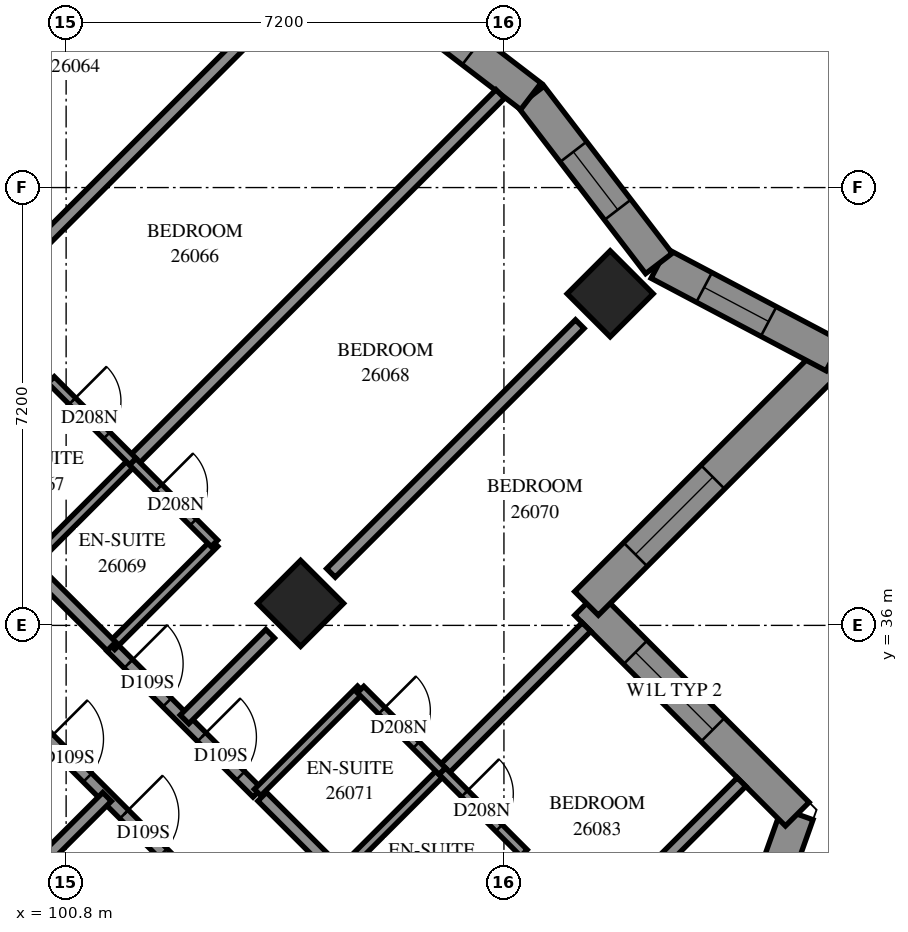
"""IFC4 building model, lengths in metres.
Left out: names, types, materials, properties, quantities, classifications, styles, units other than length and angle.
Written with IfcOpenShell. Run it as: python <this file> out.ifc"""

import sys

from ifc_helpers import new_model, si_unit, direction, frame, frame_2d, origin, origin_2d, place, context, subcontext, project, spatial, polyline, rectangle, outline, extrude, element, fill, save


model = new_model("IFC4")
c1 = context("Model", 3, precision=1e-05, world=origin(), true_north=direction((0.0, 1.0)))
c2 = subcontext(c1, "Body", "Model", "MODEL_VIEW")
j1 = project(units=[si_unit("LENGTHUNIT", "METRE"), si_unit("PLANEANGLEUNIT", "RADIAN")], contexts=[c1])
p1 = place(None, origin())
s1 = spatial("IfcSite", under=j1, at=p1, CompositionType="ELEMENT")
p2 = place(p1, origin())
s2 = spatial("IfcBuilding", under=s1, at=p2, CompositionType="ELEMENT")
p3 = place(p2, frame((0.0, 0.0, 98.2)))
s3 = spatial("IfcBuildingStorey", under=s2, at=p3, CompositionType="ELEMENT", Elevation=98.2)
for number, where, z_axis, x_axis in (
    (1, (109.747, 41.453, 0.0), (0.0, 0.0, 1.0), (0.707, -0.707, 0.0)),
    (2, (104.656, 36.362, 0.0), (0.0, 0.0, 1.0), (0.707, -0.707, 0.0)),
):
    element("IfcColumn", number, at=place(p3, frame(where, z_axis=z_axis, x_axis=x_axis)), inside=s3, PredefinedType="COLUMN", context=c2, shape_type="SweptSolid", body=[
        extrude(rectangle(XDim=1.0, YDim=1.0, at=origin_2d()), origin(), (0.0, 0.0, 1.0), 3.1),
    ])
p4 = place(p3, frame((111.041, 27.901, 0.0), z_axis=(0.0, 0.0, 1.0), x_axis=(0.3360509292, 0.9418438156, 0.0)))
e3 = element("IfcWall", 3, at=p4, inside=s3, PredefinedType="SOLIDWALL", context=c2, shape_type="SweptSolid", body=[
    extrude(outline(polyline([(-0.125, -0.275), (5.478, -0.275), (5.13, 0.275), (0.125, 0.275), (-0.125, -0.275)])), origin(), (0.0, 0.0, 1.0), 3.1),
])
p5 = place(p4, frame((1.466, 0.0, 0.5)))
e4 = element("IfcOpeningElement", 4, at=p5, cuts=e3, PredefinedType="OPENING", context=c2, shape_type="SweptSolid", body=[
    extrude(rectangle(XDim=1.3, YDim=2.45, at=frame_2d((0.65, 1.225))), frame((0.0, 0.285, 0.0), z_axis=(0.0, -1.0, 0.0), x_axis=(1.0, 0.0, 0.0)), (0.0, 0.0, 1.0), 0.57),
])
p6 = place(p4, frame((2.966, 0.0, 0.5)))
e5 = element("IfcOpeningElement", 5, at=p6, cuts=e3, PredefinedType="OPENING", context=c2, shape_type="SweptSolid", body=[
    extrude(rectangle(XDim=1.3, YDim=2.45, at=frame_2d((0.65, 1.225))), frame((0.0, 0.285, 0.0), z_axis=(0.0, -1.0, 0.0), x_axis=(1.0, 0.0, 0.0)), (0.0, 0.0, 1.0), 0.57),
])
p7 = place(p3, frame((112.824, 32.896, 0.0), z_axis=(0.0, 0.0, 1.0), x_axis=(-0.7071067812, 0.7071067812, 0.0)))
e6 = element("IfcWall", 6, at=p7, inside=s3, PredefinedType="SOLIDWALL", context=c2, shape_type="SweptSolid", body=[
    extrude(outline(polyline([(-0.174, -0.275), (4.626, -0.275), (5.176, 0.275), (0.174, 0.275), (-0.174, -0.275)])), origin(), (0.0, 0.0, 1.0), 3.1),
])
p8 = place(p7, frame((1.964, 0.0, 0.6)))
e7 = element("IfcOpeningElement", 7, at=p8, cuts=e6, PredefinedType="OPENING", context=c2, shape_type="SweptSolid", body=[
    extrude(rectangle(XDim=1.8, YDim=1.9, at=frame_2d((0.9, 0.95))), frame((0.0, 0.285, 0.0), z_axis=(0.0, -1.0, 0.0), x_axis=(1.0, 0.0, 0.0)), (0.0, 0.0, 1.0), 0.57),
])
p9 = place(p3, frame((109.358, 36.362, 0.0), z_axis=(0.0, 0.0, 1.0), x_axis=(0.7071067812, 0.7071067812, 0.0)))
e8 = element("IfcWall", 8, at=p9, inside=s3, PredefinedType="SOLIDWALL", context=c2, shape_type="SweptSolid", body=[
    extrude(outline(polyline([(0.275, -0.275), (6.126, -0.275), (5.381, 0.275), (-0.275, 0.275), (0.275, -0.275)])), origin(), (0.0, 0.0, 1.0), 3.1),
])
p10 = place(p9, frame((1.137, 0.0, 0.6)))
e9 = element("IfcOpeningElement", 9, at=p10, cuts=e8, PredefinedType="OPENING", context=c2, shape_type="SweptSolid", body=[
    extrude(rectangle(XDim=1.8, YDim=1.9, at=frame_2d((0.9, 0.95))), frame((0.0, 0.285, 0.0), z_axis=(0.0, -1.0, 0.0), x_axis=(1.0, 0.0, 0.0)), (0.0, 0.0, 1.0), 0.57),
])
p11 = place(p3, frame((113.426, 40.43, 0.0), z_axis=(0.0, 0.0, 1.0), x_axis=(-0.8840216829, 0.4674458944, 0.0)))
e10 = element("IfcWall", 10, at=p11, inside=s3, PredefinedType="SOLIDWALL", context=c2, shape_type="SweptSolid", body=[
    extrude(outline(polyline([(-0.372, -0.275), (3.195, -0.275), (3.316, 0.275), (0.372, 0.275), (-0.372, -0.275)])), origin(), (0.0, 0.0, 1.0), 3.1),
])
p12 = place(p11, frame((1.214, 0.0, 0.5)))
e11 = element("IfcOpeningElement", 11, at=p12, cuts=e10, PredefinedType="OPENING", context=c2, shape_type="SweptSolid", body=[
    extrude(rectangle(XDim=1.2, YDim=2.45, at=frame_2d((0.6, 1.225))), frame((0.0, 0.285, 0.0), z_axis=(0.0, -1.0, 0.0), x_axis=(1.0, 0.0, 0.0)), (0.0, 0.0, 1.0), 0.57),
])
p13 = place(p3, frame((110.549, 41.952, 0.0), z_axis=(0.0, 0.0, 1.0), x_axis=(-0.6082751206, 0.7937262612, 0.0)))
e12 = element("IfcWall", 12, at=p13, inside=s3, PredefinedType="SOLIDWALL", context=c2, shape_type="SweptSolid", body=[
    extrude(outline(polyline([(0.06, -0.275), (3.499, -0.275), (3.426, 0.275), (-0.06, 0.275), (0.06, -0.275)])), origin(), (0.0, 0.0, 1.0), 3.1),
])
p14 = place(p13, frame((1.113, 0.0, 0.5)))
e13 = element("IfcOpeningElement", 13, at=p14, cuts=e12, PredefinedType="OPENING", context=c2, shape_type="SweptSolid", body=[
    extrude(rectangle(XDim=1.2, YDim=2.45, at=frame_2d((0.6, 1.225))), frame((0.0, 0.285, 0.0), z_axis=(0.0, -1.0, 0.0), x_axis=(1.0, 0.0, 0.0)), (0.0, 0.0, 1.0), 0.57),
])
p15 = place(p3, frame((108.442, 44.7, 0.0), z_axis=(0.0, 0.0, 1.0), x_axis=(-0.7937392534, 0.6082581669, 0.0)))
e14 = element("IfcWall", 14, at=p15, inside=s3, PredefinedType="SOLIDWALL", context=c2, shape_type="SweptSolid", body=[
    extrude(outline(polyline([(-0.036, -0.275), (3.403, -0.275), (3.475, 0.275), (0.036, 0.275), (-0.036, -0.275)])), origin(), (0.0, 0.0, 1.0), 3.1),
])
p16 = place(p15, frame((1.212, 0.0, 0.5)))
e15 = element("IfcOpeningElement", 15, at=p16, cuts=e14, PredefinedType="OPENING", context=c2, shape_type="SweptSolid", body=[
    extrude(rectangle(XDim=1.2, YDim=2.45, at=frame_2d((0.6, 1.225))), frame((0.0, 0.285, 0.0), z_axis=(0.0, -1.0, 0.0), x_axis=(1.0, 0.0, 0.0)), (0.0, 0.0, 1.0), 0.57),
])
p17 = place(p3, frame((93.339, 41.309, 0.0), z_axis=(0.0, 0.0, 1.0), x_axis=(0.7071067812, -0.7071067812, 0.0)))
e16 = element("IfcWall", 16, at=p17, inside=s3, PredefinedType="PARTITIONING", context=c2, shape_type="SweptSolid", body=[
    extrude(rectangle(XDim=18.702, YDim=0.2, at=frame_2d((9.351, 0.0))), origin(), (0.0, 0.0, 1.0), 3.1),
])
p18 = place(p17, frame((3.05, 0.0, 0.0)))
e17 = element("IfcOpeningElement", 17, at=p18, cuts=e16, PredefinedType="OPENING", context=c2, shape_type="SweptSolid", body=[
    extrude(rectangle(XDim=0.9, YDim=2.1, at=frame_2d((0.45, 1.05))), frame((0.0, 0.11, 0.0), z_axis=(0.0, -1.0, 0.0), x_axis=(1.0, 0.0, 0.0)), (0.0, 0.0, 1.0), 0.22),
])
p19 = place(p17, frame((4.7, 0.0, 0.0)))
e18 = element("IfcOpeningElement", 18, at=p19, cuts=e16, PredefinedType="OPENING", context=c2, shape_type="SweptSolid", body=[
    extrude(rectangle(XDim=0.9, YDim=2.1, at=frame_2d((0.45, 1.05))), frame((0.0, 0.11, 0.0), z_axis=(0.0, -1.0, 0.0), x_axis=(1.0, 0.0, 0.0)), (0.0, 0.0, 1.0), 0.22),
])
p20 = place(p17, frame((10.149, 0.0, 0.0)))
e19 = element("IfcOpeningElement", 19, at=p20, cuts=e16, PredefinedType="OPENING", context=c2, shape_type="SweptSolid", body=[
    extrude(rectangle(XDim=0.9, YDim=2.1, at=frame_2d((0.45, 1.05))), frame((0.0, 0.11, 0.0), z_axis=(0.0, -1.0, 0.0), x_axis=(1.0, 0.0, 0.0)), (0.0, 0.0, 1.0), 0.22),
])
p21 = place(p17, frame((11.9, 0.0, 0.0)))
e20 = element("IfcOpeningElement", 20, at=p21, cuts=e16, PredefinedType="OPENING", context=c2, shape_type="SweptSolid", body=[
    extrude(rectangle(XDim=0.9, YDim=2.1, at=frame_2d((0.45, 1.05))), frame((0.0, 0.11, 0.0), z_axis=(0.0, -1.0, 0.0), x_axis=(1.0, 0.0, 0.0)), (0.0, 0.0, 1.0), 0.22),
])
p22 = place(p17, frame((17.45, 0.0, 0.0)))
e21 = element("IfcOpeningElement", 21, at=p22, cuts=e16, PredefinedType="OPENING", context=c2, shape_type="SweptSolid", body=[
    extrude(rectangle(XDim=0.9, YDim=2.1, at=frame_2d((0.45, 1.05))), frame((0.0, 0.11, 0.0), z_axis=(0.0, -1.0, 0.0), x_axis=(1.0, 0.0, 0.0)), (0.0, 0.0, 1.0), 0.22),
])
p23 = place(p3, frame((94.615, 42.587, 0.0), z_axis=(0.0, 0.0, 1.0), x_axis=(0.7071067812, 0.7071067812, 0.0)))
e22 = element("IfcWall", 22, at=p23, inside=s3, PredefinedType="PARTITIONING", context=c2, shape_type="SweptSolid", body=[
    extrude(rectangle(XDim=9.198, YDim=0.2, at=frame_2d((4.599, 0.0))), origin(), (0.0, 0.0, 1.0), 3.1),
])
p24 = place(p23, frame((0.248, 0.0, 0.0)))
e23 = element("IfcOpeningElement", 23, at=p24, cuts=e22, PredefinedType="OPENING", context=c2, shape_type="SweptSolid", body=[
    extrude(rectangle(XDim=1.0, YDim=2.1, at=frame_2d((0.5, 1.05))), frame((0.0, 0.11, 0.0), z_axis=(0.0, -1.0, 0.0), x_axis=(1.0, 0.0, 0.0)), (0.0, 0.0, 1.0), 0.22),
])
p25 = place(p3, frame((101.896, 38.698, 0.0), z_axis=(0.0, 0.0, 1.0), x_axis=(0.7072296489, 0.7069838921, 0.0)))
e24 = element("IfcWall", 24, at=p25, inside=s3, PredefinedType="PARTITIONING", context=c2, shape_type="SweptSolid", body=[
    extrude(rectangle(XDim=8.545, YDim=0.2, at=frame_2d((4.272, 0.0))), origin(), (0.0, 0.0, 1.0), 3.1),
])
p26 = place(p3, frame((96.805, 43.787, 0.0), z_axis=(0.0, 0.0, 1.0), x_axis=(0.7071126661, 0.7071008962, 0.0)))
e25 = element("IfcWall", 25, at=p26, inside=s3, PredefinedType="PARTITIONING", context=c2, shape_type="SweptSolid", body=[
    extrude(rectangle(XDim=8.496, YDim=0.2, at=frame_2d((4.248, 0.0))), origin(), (0.0, 0.0, 1.0), 3.1),
])
for number, where, z_axis, x_axis in (
    (26, (105.155, 36.863, 0.0), (0.0, 0.0, 1.0), (0.707, 0.707, 0.0)),
    (27, (100.063, 41.953, 0.0), (0.0, 0.0, 1.0), (0.707, 0.707, 0.0)),
):
    element("IfcWall", number, at=place(p3, frame(where, z_axis=z_axis, x_axis=x_axis)), inside=s3, PredefinedType="PARTITIONING", context=c2, shape_type="SweptSolid", body=[
        extrude(rectangle(XDim=5.787, YDim=0.2, at=frame_2d((2.893, 0.0))), origin(), (0.0, 0.0, 1.0), 3.1),
    ])
p27 = place(p3, frame((104.023, 33.184, 0.0), z_axis=(0.0, 0.0, 1.0), x_axis=(0.7071067812, -0.7071067812, 0.0)))
e28 = element("IfcWall", 28, at=p27, inside=s3, PredefinedType="PARTITIONING", context=c2, shape_type="SweptSolid", body=[
    extrude(rectangle(XDim=5.399, YDim=0.2, at=frame_2d((2.7, 0.0))), origin(), (0.0, 0.0, 1.0), 3.1),
])
p28 = place(p27, frame((4.08, 0.0, 0.0)))
e29 = element("IfcOpeningElement", 29, at=p28, cuts=e28, PredefinedType="OPENING", context=c2, shape_type="SweptSolid", body=[
    extrude(rectangle(XDim=0.9, YDim=2.1, at=frame_2d((0.45, 1.05))), frame((0.0, 0.11, 0.0), z_axis=(0.0, -1.0, 0.0), x_axis=(1.0, 0.0, 0.0)), (0.0, 0.0, 1.0), 0.22),
])
p29 = place(p3, frame((101.541, 35.651, 0.0), z_axis=(0.0, 0.0, 1.0), x_axis=(0.7071067812, -0.7071067812, 0.0)))
e30 = element("IfcWall", 30, at=p29, inside=s3, PredefinedType="PARTITIONING", context=c2, shape_type="SweptSolid", body=[
    extrude(rectangle(XDim=3.4, YDim=0.2, at=frame_2d((1.7, 0.0))), origin(), (0.0, 0.0, 1.0), 3.1),
])
p30 = place(p29, frame((0.4, 0.0, 0.0)))
e31 = element("IfcOpeningElement", 31, at=p30, cuts=e30, PredefinedType="OPENING", context=c2, shape_type="SweptSolid", body=[
    extrude(rectangle(XDim=0.9, YDim=2.1, at=frame_2d((0.45, 1.05))), frame((0.0, 0.11, 0.0), z_axis=(0.0, -1.0, 0.0), x_axis=(1.0, 0.0, 0.0)), (0.0, 0.0, 1.0), 0.22),
])
p31 = place(p29, frame((2.105, 0.0, 0.0)))
e32 = element("IfcOpeningElement", 32, at=p31, cuts=e30, PredefinedType="OPENING", context=c2, shape_type="SweptSolid", body=[
    extrude(rectangle(XDim=0.9, YDim=2.1, at=frame_2d((0.45, 1.05))), frame((0.0, 0.11, 0.0), z_axis=(0.0, -1.0, 0.0), x_axis=(1.0, 0.0, 0.0)), (0.0, 0.0, 1.0), 0.22),
])
p32 = place(p3, frame((106.989, 33.605, 0.0), z_axis=(0.0, 0.0, 1.0), x_axis=(0.7071067812, 0.7071067812, 0.0)))
e33 = element("IfcWall", 33, at=p32, inside=s3, PredefinedType="PARTITIONING", context=c2, shape_type="SweptSolid", body=[
    extrude(rectangle(XDim=3.35, YDim=0.2, at=frame_2d((1.675, 0.0))), origin(), (0.0, 0.0, 1.0), 3.1),
])
for number, where, z_axis, x_axis in (
    (34, (100.203, 36.997, 0.0), (0.0, 0.0, 1.0), (0.707, 0.708, 0.0)),
    (35, (105.29, 31.91, 0.0), (0.0, 0.0, 1.0), (0.708, 0.707, 0.0)),
):
    element("IfcWall", number, at=place(p3, frame(where, z_axis=z_axis, x_axis=x_axis)), inside=s3, PredefinedType="PARTITIONING", context=c2, shape_type="SweptSolid", body=[
        extrude(rectangle(XDim=2.4, YDim=0.15, at=frame_2d((1.2, 0.0))), origin(), (0.0, 0.0, 1.0), 3.1),
    ])
for number, where, z_axis, x_axis in (
    (36, (98.857, 38.343, 0.0), (0.0, 0.0, 1.0), (0.707, 0.707, 0.0)),
    (37, (101.545, 35.657, 0.0), (0.0, 0.0, 1.0), (0.707, 0.707, 0.0)),
    (38, (106.635, 30.565, 0.0), (0.0, 0.0, 1.0), (0.707, 0.707, 0.0)),
    (39, (103.949, 33.253, 0.0), (0.0, 0.0, 1.0), (0.707, 0.707, 0.0)),
):
    element("IfcWall", number, at=place(p3, frame(where, z_axis=z_axis, x_axis=x_axis)), inside=s3, PredefinedType="PARTITIONING", context=c2, shape_type="SweptSolid", body=[
        extrude(rectangle(XDim=2.398, YDim=0.15, at=frame_2d((1.199, 0.0))), origin(), (0.0, 0.0, 1.0), 3.1),
    ])
p33 = place(p3, frame((110.251, 31.767, 0.0), z_axis=(0.0, 0.0, 1.0), x_axis=(0.7066584143, 0.7075548639, 0.0)))
e40 = element("IfcWall", 40, at=p33, inside=s3, PredefinedType="PARTITIONING", context=c2, shape_type="SweptSolid", body=[
    extrude(rectangle(XDim=2.343, YDim=0.2, at=frame_2d((1.171, 0.0))), origin(), (0.0, 0.0, 1.0), 3.1),
])
p34 = place(p3, frame((100.063, 31.771, 0.0), z_axis=(0.0, 0.0, 1.0), x_axis=(0.7071067812, 0.7071067812, 0.0)))
e41 = element("IfcWall", 41, at=p34, inside=s3, PredefinedType="PARTITIONING", context=c2, shape_type="SweptSolid", body=[
    extrude(rectangle(XDim=1.994, YDim=0.2, at=frame_2d((0.997, 0.0))), origin(), (0.0, 0.0, 1.0), 3.1),
])
p35 = place(p3, frame((102.747, 34.455, 0.0), z_axis=(0.0, 0.0, 1.0), x_axis=(0.7071067812, 0.7071067812, 0.0)))
e42 = element("IfcWall", 42, at=p35, inside=s3, PredefinedType="PARTITIONING", context=c2, shape_type="SweptSolid", body=[
    extrude(rectangle(XDim=1.991, YDim=0.2, at=frame_2d((0.996, 0.0))), origin(), (0.0, 0.0, 1.0), 3.1),
])
p36 = place(p3, frame((101.894, 38.693, 0.0), z_axis=(0.0, 0.0, 1.0), x_axis=(0.7071067812, -0.7071067812, 0.0)))
e43 = element("IfcWall", 43, at=p36, inside=s3, PredefinedType="PARTITIONING", context=c2, shape_type="SweptSolid", body=[
    extrude(rectangle(XDim=1.901, YDim=0.15, at=frame_2d((0.95, 0.0))), origin(), (0.0, 0.0, 1.0), 3.1),
])
p37 = place(p36, frame((0.608, 0.0, 0.0)))
e44 = element("IfcOpeningElement", 44, at=p37, cuts=e43, PredefinedType="OPENING", context=c2, shape_type="SweptSolid", body=[
    extrude(rectangle(XDim=0.8, YDim=2.1, at=frame_2d((0.4, 1.05))), frame((0.0, 0.085, 0.0), z_axis=(0.0, -1.0, 0.0), x_axis=(1.0, 0.0, 0.0)), (0.0, 0.0, 1.0), 0.17),
])
p38 = place(p3, frame((105.642, 34.944, 0.0), z_axis=(0.0, 0.0, 1.0), x_axis=(0.7071067812, -0.7071067812, 0.0)))
e45 = element("IfcWall", 45, at=p38, inside=s3, PredefinedType="PARTITIONING", context=c2, shape_type="SweptSolid", body=[
    extrude(rectangle(XDim=1.901, YDim=0.15, at=frame_2d((0.95, 0.0))), origin(), (0.0, 0.0, 1.0), 3.1),
])
p39 = place(p38, frame((0.491, 0.0, 0.0)))
e46 = element("IfcOpeningElement", 46, at=p39, cuts=e45, PredefinedType="OPENING", context=c2, shape_type="SweptSolid", body=[
    extrude(rectangle(XDim=0.8, YDim=2.1, at=frame_2d((0.4, 1.05))), frame((0.0, 0.085, 0.0), z_axis=(0.0, -1.0, 0.0), x_axis=(1.0, 0.0, 0.0)), (0.0, 0.0, 1.0), 0.17),
])
p40 = place(p3, frame((100.553, 40.037, 0.0), z_axis=(0.0, 0.0, 1.0), x_axis=(0.7076330979, -0.7065800724, 0.0)))
e47 = element("IfcWall", 47, at=p40, inside=s3, PredefinedType="PARTITIONING", context=c2, shape_type="SweptSolid", body=[
    extrude(rectangle(XDim=1.899, YDim=0.15, at=frame_2d((0.95, 0.0))), origin(), (0.0, 0.0, 1.0), 3.1),
])
p41 = place(p40, frame((0.493, 0.0, 0.0)))
e48 = element("IfcOpeningElement", 48, at=p41, cuts=e47, PredefinedType="OPENING", context=c2, shape_type="SweptSolid", body=[
    extrude(rectangle(XDim=0.8, YDim=2.1, at=frame_2d((0.4, 1.05))), frame((0.0, 0.085, 0.0), z_axis=(0.0, -1.0, 0.0), x_axis=(1.0, 0.0, 0.0)), (0.0, 0.0, 1.0), 0.17),
])
p42 = place(p3, frame((100.201, 36.997, 0.0), z_axis=(0.0, 0.0, 1.0), x_axis=(0.7076330979, -0.7065800724, 0.0)))
e49 = element("IfcWall", 49, at=p42, inside=s3, PredefinedType="PARTITIONING", context=c2, shape_type="SweptSolid", body=[
    extrude(rectangle(XDim=1.899, YDim=0.2, at=frame_2d((0.95, 0.0))), origin(), (0.0, 0.0, 1.0), 3.1),
])
p43 = place(p3, frame((106.987, 33.602, 0.0), z_axis=(0.0, 0.0, 1.0), x_axis=(0.7065800724, -0.7076330979, 0.0)))
e50 = element("IfcWall", 50, at=p43, inside=s3, PredefinedType="PARTITIONING", context=c2, shape_type="SweptSolid", body=[
    extrude(rectangle(XDim=1.899, YDim=0.15, at=frame_2d((0.95, 0.0))), origin(), (0.0, 0.0, 1.0), 3.1),
])
p44 = place(p43, frame((0.519, 0.0, 0.0)))
e51 = element("IfcOpeningElement", 51, at=p44, cuts=e50, PredefinedType="OPENING", context=c2, shape_type="SweptSolid", body=[
    extrude(rectangle(XDim=0.8, YDim=2.1, at=frame_2d((0.4, 1.05))), frame((0.0, 0.085, 0.0), z_axis=(0.0, -1.0, 0.0), x_axis=(1.0, 0.0, 0.0)), (0.0, 0.0, 1.0), 0.17),
])
p45 = place(p8, origin())
e52 = element("IfcWindow", 52, at=p45, inside=s3, PartitioningType="SINGLE_PANEL", PredefinedType="WINDOW", context=c2, shape_type="SweptSolid", body=[
    extrude(rectangle(XDim=1.8, YDim=1.9, at=frame_2d((0.9, 0.95))), frame((0.0, 0.155, 0.0), z_axis=(0.0, -1.0, 0.0), x_axis=(1.0, 0.0, 0.0)), (0.0, 0.0, 1.0), 0.06),
])
fill(e7, e52)
p46 = place(p10, origin())
e53 = element("IfcWindow", 53, at=p46, inside=s3, PartitioningType="SINGLE_PANEL", PredefinedType="WINDOW", context=c2, shape_type="SweptSolid", body=[
    extrude(rectangle(XDim=1.8, YDim=1.9, at=frame_2d((0.9, 0.95))), frame((0.0, 0.155, 0.0), z_axis=(0.0, -1.0, 0.0), x_axis=(1.0, 0.0, 0.0)), (0.0, 0.0, 1.0), 0.06),
])
fill(e9, e53)
p47 = place(p12, origin())
e54 = element("IfcWindow", 54, at=p47, inside=s3, PartitioningType="SINGLE_PANEL", PredefinedType="WINDOW", context=c2, shape_type="SweptSolid", body=[
    extrude(rectangle(XDim=1.2, YDim=2.45, at=frame_2d((0.6, 1.225))), frame((0.0, 0.155, 0.0), z_axis=(0.0, -1.0, 0.0), x_axis=(1.0, 0.0, 0.0)), (0.0, 0.0, 1.0), 0.06),
])
fill(e11, e54)
p48 = place(p14, origin())
e55 = element("IfcWindow", 55, at=p48, inside=s3, PartitioningType="SINGLE_PANEL", PredefinedType="WINDOW", context=c2, shape_type="SweptSolid", body=[
    extrude(rectangle(XDim=1.2, YDim=2.45, at=frame_2d((0.6, 1.225))), frame((0.0, 0.155, 0.0), z_axis=(0.0, -1.0, 0.0), x_axis=(1.0, 0.0, 0.0)), (0.0, 0.0, 1.0), 0.06),
])
fill(e13, e55)
p49 = place(p16, origin())
e56 = element("IfcWindow", 56, at=p49, inside=s3, PartitioningType="SINGLE_PANEL", PredefinedType="WINDOW", context=c2, shape_type="SweptSolid", body=[
    extrude(rectangle(XDim=1.2, YDim=2.45, at=frame_2d((0.6, 1.225))), frame((0.0, 0.155, 0.0), z_axis=(0.0, -1.0, 0.0), x_axis=(1.0, 0.0, 0.0)), (0.0, 0.0, 1.0), 0.06),
])
fill(e15, e56)
p50 = place(p41, origin())
e57 = element("IfcDoor", 57, at=p50, inside=s3, OperationType="SINGLE_SWING_RIGHT", PredefinedType="DOOR", context=c2, shape_type="SweptSolid", body=[
    extrude(rectangle(XDim=0.8, YDim=2.1, at=frame_2d((0.4, 1.05))), frame((0.0, 0.025, 0.0), z_axis=(0.0, -1.0, 0.0), x_axis=(1.0, 0.0, 0.0)), (0.0, 0.0, 1.0), 0.05),
])
fill(e48, e57)
p51 = place(p30, origin())
e58 = element("IfcDoor", 58, at=p51, inside=s3, OperationType="SINGLE_SWING_RIGHT", PredefinedType="DOOR", context=c2, shape_type="SweptSolid", body=[
    extrude(rectangle(XDim=0.9, YDim=2.1, at=frame_2d((0.45, 1.05))), frame((0.0, 0.025, 0.0), z_axis=(0.0, -1.0, 0.0), x_axis=(1.0, 0.0, 0.0)), (0.0, 0.0, 1.0), 0.05),
])
fill(e31, e58)
p52 = place(p37, origin())
e59 = element("IfcDoor", 59, at=p52, inside=s3, OperationType="SINGLE_SWING_RIGHT", PredefinedType="DOOR", context=c2, shape_type="SweptSolid", body=[
    extrude(rectangle(XDim=0.8, YDim=2.1, at=frame_2d((0.4, 1.05))), frame((0.0, 0.025, 0.0), z_axis=(0.0, -1.0, 0.0), x_axis=(1.0, 0.0, 0.0)), (0.0, 0.0, 1.0), 0.05),
])
fill(e44, e59)
p53 = place(p31, origin())
e60 = element("IfcDoor", 60, at=p53, inside=s3, OperationType="SINGLE_SWING_LEFT", PredefinedType="DOOR", context=c2, shape_type="SweptSolid", body=[
    extrude(rectangle(XDim=0.9, YDim=2.1, at=frame_2d((0.45, 1.05))), frame((0.0, 0.025, 0.0), z_axis=(0.0, -1.0, 0.0), x_axis=(1.0, 0.0, 0.0)), (0.0, 0.0, 1.0), 0.05),
])
fill(e32, e60)
p54 = place(p39, origin())
e61 = element("IfcDoor", 61, at=p54, inside=s3, OperationType="SINGLE_SWING_RIGHT", PredefinedType="DOOR", context=c2, shape_type="SweptSolid", body=[
    extrude(rectangle(XDim=0.8, YDim=2.1, at=frame_2d((0.4, 1.05))), frame((0.0, 0.025, 0.0), z_axis=(0.0, -1.0, 0.0), x_axis=(1.0, 0.0, 0.0)), (0.0, 0.0, 1.0), 0.05),
])
fill(e46, e61)
p55 = place(p20, origin())
e62 = element("IfcDoor", 62, at=p55, inside=s3, OperationType="SINGLE_SWING_LEFT", PredefinedType="DOOR", context=c2, shape_type="SweptSolid", body=[
    extrude(rectangle(XDim=0.9, YDim=2.1, at=frame_2d((0.45, 1.05))), frame((0.0, 0.025, 0.0), z_axis=(0.0, -1.0, 0.0), x_axis=(1.0, 0.0, 0.0)), (0.0, 0.0, 1.0), 0.05),
])
fill(e19, e62)
p56 = place(p21, origin())
e63 = element("IfcDoor", 63, at=p56, inside=s3, OperationType="SINGLE_SWING_RIGHT", PredefinedType="DOOR", context=c2, shape_type="SweptSolid", body=[
    extrude(rectangle(XDim=0.9, YDim=2.1, at=frame_2d((0.45, 1.05))), frame((0.0, 0.025, 0.0), z_axis=(0.0, -1.0, 0.0), x_axis=(1.0, 0.0, 0.0)), (0.0, 0.0, 1.0), 0.05),
])
fill(e20, e63)
p57 = place(p44, origin())
e64 = element("IfcDoor", 64, at=p57, inside=s3, OperationType="SINGLE_SWING_RIGHT", PredefinedType="DOOR", context=c2, shape_type="SweptSolid", body=[
    extrude(rectangle(XDim=0.8, YDim=2.1, at=frame_2d((0.4, 1.05))), frame((0.0, 0.025, 0.0), z_axis=(0.0, -1.0, 0.0), x_axis=(1.0, 0.0, 0.0)), (0.0, 0.0, 1.0), 0.05),
])
fill(e51, e64)
save(model, sys.argv[1])
